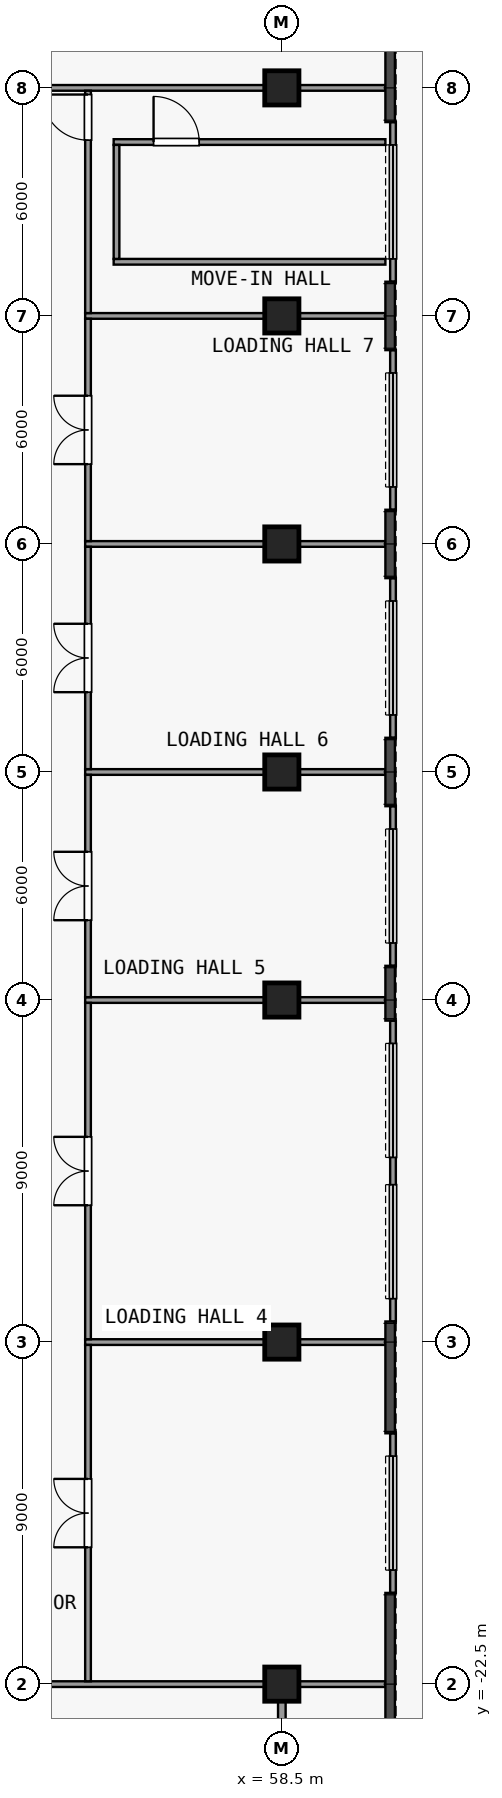
"""IFC4 building model, lengths in metres.
Left out: names, types, materials, properties, quantities, classifications, styles, units other than length and angle.
Written with IfcOpenShell. Run it as: python <this file> out.ifc"""

import sys

from ifc_helpers import new_model, si_unit, direction, frame, frame_2d, origin, origin_2d, place, context, subcontext, project, spatial, rectangle, extrude, element, fill, save


model = new_model("IFC4")
c1 = context("Model", 3, precision=1e-05, world=origin(), true_north=direction((0.0, 1.0)))
c2 = subcontext(c1, "Body", "Model", "MODEL_VIEW")
j1 = project(units=[si_unit("LENGTHUNIT", "METRE"), si_unit("PLANEANGLEUNIT", "RADIAN")], contexts=[c1])
p1 = place(None, origin())
s1 = spatial("IfcSite", under=j1, at=p1, CompositionType="ELEMENT")
p2 = place(p1, origin())
s2 = spatial("IfcBuilding", under=s1, at=p2, CompositionType="ELEMENT")
p3 = place(p2, origin())
s3 = spatial("IfcBuildingStorey", under=s2, at=p3, CompositionType="ELEMENT", Elevation=0.0)
for number, where, z_axis, x_axis in (
    (1, (58.5, -22.5, 0.0), (0.0, 0.0, 1.0), (1.0, 0.0, 0.0)),
    (2, (58.5, -13.5, 0.0), (0.0, 0.0, 1.0), (1.0, 0.0, 0.0)),
    (3, (58.5, -4.5, 0.0), (0.0, 0.0, 1.0), (1.0, 0.0, 0.0)),
    (4, (58.5, 1.5, 0.0), (0.0, 0.0, 1.0), (1.0, 0.0, 0.0)),
    (5, (58.5, 7.5, 0.0), (0.0, 0.0, 1.0), (1.0, 0.0, 0.0)),
    (6, (58.5, 13.5, 0.0), (0.0, 0.0, 1.0), (1.0, 0.0, 0.0)),
    (7, (58.5, 19.5, 0.0), (0.0, 0.0, 1.0), (1.0, 0.0, 0.0)),
):
    element("IfcColumn", number, at=place(p3, frame(where, z_axis=z_axis, x_axis=x_axis)), inside=s3, PredefinedType="COLUMN", context=c2, shape_type="SweptSolid", body=[
        extrude(rectangle(XDim=0.9, YDim=0.9, at=origin_2d()), origin(), (0.0, 0.0, 1.0), 8.0),
    ])
p4 = place(p3, frame((49.95, -22.5, 0.0), z_axis=(0.0, 0.0, 1.0), x_axis=(1.0, 0.0, 0.0)))
e8 = element("IfcWall", 8, at=p4, inside=s3, PredefinedType="PARTITIONING", context=c2, shape_type="SweptSolid", body=[
    extrude(rectangle(XDim=8.1, YDim=0.15, at=frame_2d((4.05, 0.0))), origin(), (0.0, 0.0, 1.0), 7.65),
])
p5 = place(p3, frame((58.95, -22.5, 0.0), z_axis=(0.0, 0.0, 1.0), x_axis=(1.0, 0.0, 0.0)))
e9 = element("IfcWall", 9, at=p5, inside=s3, PredefinedType="PARTITIONING", context=c2, shape_type="SweptSolid", body=[
    extrude(rectangle(XDim=2.275, YDim=0.15, at=frame_2d((1.138, 0.0))), origin(), (0.0, 0.0, 1.0), 7.65),
])
p6 = place(p3, frame((53.325, -13.5, 0.0), z_axis=(0.0, 0.0, 1.0), x_axis=(1.0, 0.0, 0.0)))
e10 = element("IfcWall", 10, at=p6, inside=s3, PredefinedType="PARTITIONING", context=c2, shape_type="SweptSolid", body=[
    extrude(rectangle(XDim=4.725, YDim=0.15, at=frame_2d((2.363, 0.0))), origin(), (0.0, 0.0, 1.0), 7.65),
])
p7 = place(p3, frame((58.95, -13.5, 0.0), z_axis=(0.0, 0.0, 1.0), x_axis=(1.0, 0.0, 0.0)))
e11 = element("IfcWall", 11, at=p7, inside=s3, PredefinedType="PARTITIONING", context=c2, shape_type="SweptSolid", body=[
    extrude(rectangle(XDim=2.275, YDim=0.15, at=frame_2d((1.138, 0.0))), origin(), (0.0, 0.0, 1.0), 7.65),
])
p8 = place(p3, frame((53.325, -4.5, 0.0), z_axis=(0.0, 0.0, 1.0), x_axis=(1.0, 0.0, 0.0)))
e12 = element("IfcWall", 12, at=p8, inside=s3, PredefinedType="PARTITIONING", context=c2, shape_type="SweptSolid", body=[
    extrude(rectangle(XDim=4.725, YDim=0.15, at=frame_2d((2.363, 0.0))), origin(), (0.0, 0.0, 1.0), 7.65),
])
p9 = place(p3, frame((58.95, -4.5, 0.0), z_axis=(0.0, 0.0, 1.0), x_axis=(1.0, 0.0, 0.0)))
e13 = element("IfcWall", 13, at=p9, inside=s3, PredefinedType="PARTITIONING", context=c2, shape_type="SweptSolid", body=[
    extrude(rectangle(XDim=2.275, YDim=0.15, at=frame_2d((1.138, 0.0))), origin(), (0.0, 0.0, 1.0), 7.65),
])
p10 = place(p3, frame((53.325, 1.5, 0.0), z_axis=(0.0, 0.0, 1.0), x_axis=(1.0, 0.0, 0.0)))
e14 = element("IfcWall", 14, at=p10, inside=s3, PredefinedType="PARTITIONING", context=c2, shape_type="SweptSolid", body=[
    extrude(rectangle(XDim=4.725, YDim=0.15, at=frame_2d((2.363, 0.0))), origin(), (0.0, 0.0, 1.0), 7.65),
])
p11 = place(p3, frame((58.95, 1.5, 0.0), z_axis=(0.0, 0.0, 1.0), x_axis=(1.0, 0.0, 0.0)))
e15 = element("IfcWall", 15, at=p11, inside=s3, PredefinedType="PARTITIONING", context=c2, shape_type="SweptSolid", body=[
    extrude(rectangle(XDim=2.275, YDim=0.15, at=frame_2d((1.138, 0.0))), origin(), (0.0, 0.0, 1.0), 7.65),
])
p12 = place(p3, frame((53.325, 7.5, 0.0), z_axis=(0.0, 0.0, 1.0), x_axis=(1.0, 0.0, 0.0)))
e16 = element("IfcWall", 16, at=p12, inside=s3, PredefinedType="PARTITIONING", context=c2, shape_type="SweptSolid", body=[
    extrude(rectangle(XDim=4.725, YDim=0.15, at=frame_2d((2.363, 0.0))), origin(), (0.0, 0.0, 1.0), 7.65),
])
p13 = place(p3, frame((58.95, 7.5, 0.0), z_axis=(0.0, 0.0, 1.0), x_axis=(1.0, 0.0, 0.0)))
e17 = element("IfcWall", 17, at=p13, inside=s3, PredefinedType="PARTITIONING", context=c2, shape_type="SweptSolid", body=[
    extrude(rectangle(XDim=2.275, YDim=0.15, at=frame_2d((1.138, 0.0))), origin(), (0.0, 0.0, 1.0), 7.65),
])
p14 = place(p3, frame((53.325, 13.5, 0.0), z_axis=(0.0, 0.0, 1.0), x_axis=(1.0, 0.0, 0.0)))
e18 = element("IfcWall", 18, at=p14, inside=s3, PredefinedType="PARTITIONING", context=c2, shape_type="SweptSolid", body=[
    extrude(rectangle(XDim=4.725, YDim=0.15, at=frame_2d((2.363, 0.0))), origin(), (0.0, 0.0, 1.0), 7.65),
])
p15 = place(p3, frame((58.95, 13.5, 0.0), z_axis=(0.0, 0.0, 1.0), x_axis=(1.0, 0.0, 0.0)))
e19 = element("IfcWall", 19, at=p15, inside=s3, PredefinedType="PARTITIONING", context=c2, shape_type="SweptSolid", body=[
    extrude(rectangle(XDim=2.275, YDim=0.15, at=frame_2d((1.138, 0.0))), origin(), (0.0, 0.0, 1.0), 7.65),
])
p16 = place(p3, frame((54.075, 14.925, 0.0), z_axis=(0.0, 0.0, 1.0), x_axis=(1.0, 0.0, 0.0)))
e20 = element("IfcWall", 20, at=p16, inside=s3, PredefinedType="PARTITIONING", context=c2, shape_type="SweptSolid", body=[
    extrude(rectangle(XDim=7.15, YDim=0.15, at=frame_2d((3.575, 0.0))), origin(), (0.0, 0.0, 1.0), 7.65),
])
p17 = place(p3, frame((54.075, 18.075, 0.0), z_axis=(0.0, 0.0, 1.0), x_axis=(1.0, 0.0, 0.0)))
e21 = element("IfcWall", 21, at=p17, inside=s3, PredefinedType="PARTITIONING", context=c2, shape_type="SweptSolid", body=[
    extrude(rectangle(XDim=7.15, YDim=0.15, at=frame_2d((3.575, 0.0))), origin(), (0.0, 0.0, 1.0), 7.65),
])
p18 = place(p17, frame((1.05, 0.0, 0.0)))
e22 = element("IfcOpeningElement", 22, at=p18, cuts=e21, PredefinedType="OPENING", context=c2, shape_type="SweptSolid", body=[
    extrude(rectangle(XDim=1.2, YDim=2.1, at=frame_2d((0.6, 1.05))), frame((0.0, 0.085, 0.0), z_axis=(0.0, -1.0, 0.0), x_axis=(1.0, 0.0, 0.0)), (0.0, 0.0, 1.0), 0.17),
])
p19 = place(p3, frame((49.95, 19.5, 0.0), z_axis=(0.0, 0.0, 1.0), x_axis=(1.0, 0.0, 0.0)))
e23 = element("IfcWall", 23, at=p19, inside=s3, PredefinedType="PARTITIONING", context=c2, shape_type="SweptSolid", body=[
    extrude(rectangle(XDim=8.1, YDim=0.15, at=frame_2d((4.05, 0.0))), origin(), (0.0, 0.0, 1.0), 7.65),
])
p20 = place(p3, frame((58.95, 19.5, 0.0), z_axis=(0.0, 0.0, 1.0), x_axis=(1.0, 0.0, 0.0)))
e24 = element("IfcWall", 24, at=p20, inside=s3, PredefinedType="PARTITIONING", context=c2, shape_type="SweptSolid", body=[
    extrude(rectangle(XDim=2.275, YDim=0.15, at=frame_2d((1.138, 0.0))), origin(), (0.0, 0.0, 1.0), 7.65),
])
p21 = place(p3, frame((53.4, -22.425, 0.0), z_axis=(0.0, 0.0, 1.0), x_axis=(0.0, 1.0, 0.0)))
e25 = element("IfcWall", 25, at=p21, inside=s3, PredefinedType="PARTITIONING", context=c2, shape_type="SweptSolid", body=[
    extrude(rectangle(XDim=8.85, YDim=0.15, at=frame_2d((4.425, 0.0))), origin(), (0.0, 0.0, 1.0), 7.65),
])
p22 = place(p21, frame((3.525, 0.0, 0.0)))
e26 = element("IfcOpeningElement", 26, at=p22, cuts=e25, PredefinedType="OPENING", context=c2, shape_type="SweptSolid", body=[
    extrude(rectangle(XDim=1.8, YDim=2.1, at=frame_2d((0.9, 1.05))), frame((0.0, 0.085, 0.0), z_axis=(0.0, -1.0, 0.0), x_axis=(1.0, 0.0, 0.0)), (0.0, 0.0, 1.0), 0.17),
])
p23 = place(p3, frame((53.4, -13.425, 0.0), z_axis=(0.0, 0.0, 1.0), x_axis=(0.0, 1.0, 0.0)))
e27 = element("IfcWall", 27, at=p23, inside=s3, PredefinedType="PARTITIONING", context=c2, shape_type="SweptSolid", body=[
    extrude(rectangle(XDim=8.85, YDim=0.15, at=frame_2d((4.425, 0.0))), origin(), (0.0, 0.0, 1.0), 7.65),
])
p24 = place(p23, frame((3.525, 0.0, 0.0)))
e28 = element("IfcOpeningElement", 28, at=p24, cuts=e27, PredefinedType="OPENING", context=c2, shape_type="SweptSolid", body=[
    extrude(rectangle(XDim=1.8, YDim=2.1, at=frame_2d((0.9, 1.05))), frame((0.0, 0.085, 0.0), z_axis=(0.0, -1.0, 0.0), x_axis=(1.0, 0.0, 0.0)), (0.0, 0.0, 1.0), 0.17),
])
p25 = place(p3, frame((53.4, -4.425, 0.0), z_axis=(0.0, 0.0, 1.0), x_axis=(0.0, 1.0, 0.0)))
e29 = element("IfcWall", 29, at=p25, inside=s3, PredefinedType="PARTITIONING", context=c2, shape_type="SweptSolid", body=[
    extrude(rectangle(XDim=5.85, YDim=0.15, at=frame_2d((2.925, 0.0))), origin(), (0.0, 0.0, 1.0), 7.65),
])
p26 = place(p25, frame((2.025, 0.0, 0.0)))
e30 = element("IfcOpeningElement", 30, at=p26, cuts=e29, PredefinedType="OPENING", context=c2, shape_type="SweptSolid", body=[
    extrude(rectangle(XDim=1.8, YDim=2.1, at=frame_2d((0.9, 1.05))), frame((0.0, 0.085, 0.0), z_axis=(0.0, -1.0, 0.0), x_axis=(1.0, 0.0, 0.0)), (0.0, 0.0, 1.0), 0.17),
])
p27 = place(p3, frame((53.4, 1.575, 0.0), z_axis=(0.0, 0.0, 1.0), x_axis=(0.0, 1.0, 0.0)))
e31 = element("IfcWall", 31, at=p27, inside=s3, PredefinedType="PARTITIONING", context=c2, shape_type="SweptSolid", body=[
    extrude(rectangle(XDim=5.85, YDim=0.15, at=frame_2d((2.925, 0.0))), origin(), (0.0, 0.0, 1.0), 7.65),
])
p28 = place(p27, frame((2.025, 0.0, 0.0)))
e32 = element("IfcOpeningElement", 32, at=p28, cuts=e31, PredefinedType="OPENING", context=c2, shape_type="SweptSolid", body=[
    extrude(rectangle(XDim=1.8, YDim=2.1, at=frame_2d((0.9, 1.05))), frame((0.0, 0.085, 0.0), z_axis=(0.0, -1.0, 0.0), x_axis=(1.0, 0.0, 0.0)), (0.0, 0.0, 1.0), 0.17),
])
p29 = place(p3, frame((53.4, 7.575, 0.0), z_axis=(0.0, 0.0, 1.0), x_axis=(0.0, 1.0, 0.0)))
e33 = element("IfcWall", 33, at=p29, inside=s3, PredefinedType="PARTITIONING", context=c2, shape_type="SweptSolid", body=[
    extrude(rectangle(XDim=5.85, YDim=0.15, at=frame_2d((2.925, 0.0))), origin(), (0.0, 0.0, 1.0), 7.65),
])
p30 = place(p29, frame((2.025, 0.0, 0.0)))
e34 = element("IfcOpeningElement", 34, at=p30, cuts=e33, PredefinedType="OPENING", context=c2, shape_type="SweptSolid", body=[
    extrude(rectangle(XDim=1.8, YDim=2.1, at=frame_2d((0.9, 1.05))), frame((0.0, 0.085, 0.0), z_axis=(0.0, -1.0, 0.0), x_axis=(1.0, 0.0, 0.0)), (0.0, 0.0, 1.0), 0.17),
])
p31 = place(p3, frame((53.4, 13.575, 0.0), z_axis=(0.0, 0.0, 1.0), x_axis=(0.0, 1.0, 0.0)))
e35 = element("IfcWall", 35, at=p31, inside=s3, PredefinedType="PARTITIONING", context=c2, shape_type="SweptSolid", body=[
    extrude(rectangle(XDim=5.85, YDim=0.15, at=frame_2d((2.925, 0.0))), origin(), (0.0, 0.0, 1.0), 7.65),
])
p32 = place(p31, frame((4.55, 0.0, 0.0)))
e36 = element("IfcOpeningElement", 36, at=p32, cuts=e35, PredefinedType="OPENING", context=c2, shape_type="SweptSolid", body=[
    extrude(rectangle(XDim=1.2, YDim=2.1, at=frame_2d((0.6, 1.05))), frame((0.0, 0.085, 0.0), z_axis=(0.0, -1.0, 0.0), x_axis=(1.0, 0.0, 0.0)), (0.0, 0.0, 1.0), 0.17),
])
p33 = place(p3, frame((54.15, 15.0, 0.0), z_axis=(0.0, 0.0, 1.0), x_axis=(0.0, 1.0, 0.0)))
e37 = element("IfcWall", 37, at=p33, inside=s3, PredefinedType="PARTITIONING", context=c2, shape_type="SweptSolid", body=[
    extrude(rectangle(XDim=3.0, YDim=0.15, at=frame_2d((1.5, 0.0))), origin(), (0.0, 0.0, 1.0), 7.65),
])
p34 = place(p3, frame((61.425, -15.9, 0.0), z_axis=(0.0, 0.0, 1.0), x_axis=(0.0, -1.0, 0.0)))
e38 = element("IfcWall", 38, at=p34, inside=s3, PredefinedType="SOLIDWALL", context=c2, shape_type="SweptSolid", body=[
    extrude(rectangle(XDim=4.2, YDim=0.15, at=frame_2d((2.1, 0.0))), origin(), (0.0, 0.0, 1.0), 7.65),
])
p35 = place(p34, frame((0.6, 0.0, 0.0)))
e39 = element("IfcOpeningElement", 39, at=p35, cuts=e38, PredefinedType="OPENING", context=c2, shape_type="SweptSolid", body=[
    extrude(rectangle(XDim=3.0, YDim=3.0, at=frame_2d((1.5, 1.5))), frame((0.0, 0.085, 0.0), z_axis=(0.0, -1.0, 0.0), x_axis=(1.0, 0.0, 0.0)), (0.0, 0.0, 1.0), 0.17),
])
p36 = place(p3, frame((61.425, 18.6, 0.0), z_axis=(0.0, 0.0, 1.0), x_axis=(0.0, -1.0, 0.0)))
e40 = element("IfcWall", 40, at=p36, inside=s3, PredefinedType="SOLIDWALL", context=c2, shape_type="SweptSolid", body=[
    extrude(rectangle(XDim=4.2, YDim=0.15, at=frame_2d((2.1, 0.0))), origin(), (0.0, 0.0, 1.0), 7.65),
])
p37 = place(p36, frame((0.6, 0.0, 0.0)))
e41 = element("IfcOpeningElement", 41, at=p37, cuts=e40, PredefinedType="OPENING", context=c2, shape_type="SweptSolid", body=[
    extrude(rectangle(XDim=3.0, YDim=4.3, at=frame_2d((1.5, 2.15))), frame((0.0, 0.085, 0.0), z_axis=(0.0, -1.0, 0.0), x_axis=(1.0, 0.0, 0.0)), (0.0, 0.0, 1.0), 0.17),
])
p38 = place(p3, frame((61.425, -5.042, 0.0), z_axis=(0.0, 0.0, 1.0), x_axis=(0.0, -1.0, 0.0)))
e42 = element("IfcWall", 42, at=p38, inside=s3, PredefinedType="SOLIDWALL", context=c2, shape_type="SweptSolid", body=[
    extrude(rectangle(XDim=7.917, YDim=0.15, at=frame_2d((3.958, 0.0))), origin(), (0.0, 0.0, 1.0), 7.65),
])
p39 = place(p38, frame((4.317, 0.0, 0.0)))
e43 = element("IfcOpeningElement", 43, at=p39, cuts=e42, PredefinedType="OPENING", context=c2, shape_type="SweptSolid", body=[
    extrude(rectangle(XDim=3.0, YDim=4.3, at=frame_2d((1.5, 2.15))), frame((0.0, 0.085, 0.0), z_axis=(0.0, -1.0, 0.0), x_axis=(1.0, 0.0, 0.0)), (0.0, 0.0, 1.0), 0.17),
])
p40 = place(p38, frame((0.6, 0.0, 0.0)))
e44 = element("IfcOpeningElement", 44, at=p40, cuts=e42, PredefinedType="OPENING", context=c2, shape_type="SweptSolid", body=[
    extrude(rectangle(XDim=3.0, YDim=4.3, at=frame_2d((1.5, 2.15))), frame((0.0, 0.085, 0.0), z_axis=(0.0, -1.0, 0.0), x_axis=(1.0, 0.0, 0.0)), (0.0, 0.0, 1.0), 0.17),
])
p41 = place(p3, frame((61.425, 0.6, 0.0), z_axis=(0.0, 0.0, 1.0), x_axis=(0.0, -1.0, 0.0)))
e45 = element("IfcWall", 45, at=p41, inside=s3, PredefinedType="SOLIDWALL", context=c2, shape_type="SweptSolid", body=[
    extrude(rectangle(XDim=4.2, YDim=0.15, at=frame_2d((2.1, 0.0))), origin(), (0.0, 0.0, 1.0), 7.65),
])
p42 = place(p41, frame((0.6, 0.0, 0.0)))
e46 = element("IfcOpeningElement", 46, at=p42, cuts=e45, PredefinedType="OPENING", context=c2, shape_type="SweptSolid", body=[
    extrude(rectangle(XDim=3.0, YDim=4.3, at=frame_2d((1.5, 2.15))), frame((0.0, 0.085, 0.0), z_axis=(0.0, -1.0, 0.0), x_axis=(1.0, 0.0, 0.0)), (0.0, 0.0, 1.0), 0.17),
])
p43 = place(p3, frame((61.425, 6.6, 0.0), z_axis=(0.0, 0.0, 1.0), x_axis=(0.0, -1.0, 0.0)))
e47 = element("IfcWall", 47, at=p43, inside=s3, PredefinedType="SOLIDWALL", context=c2, shape_type="SweptSolid", body=[
    extrude(rectangle(XDim=4.2, YDim=0.15, at=frame_2d((2.1, 0.0))), origin(), (0.0, 0.0, 1.0), 7.65),
])
p44 = place(p43, frame((0.6, 0.0, 0.0)))
e48 = element("IfcOpeningElement", 48, at=p44, cuts=e47, PredefinedType="OPENING", context=c2, shape_type="SweptSolid", body=[
    extrude(rectangle(XDim=3.0, YDim=4.3, at=frame_2d((1.5, 2.15))), frame((0.0, 0.085, 0.0), z_axis=(0.0, -1.0, 0.0), x_axis=(1.0, 0.0, 0.0)), (0.0, 0.0, 1.0), 0.17),
])
p45 = place(p3, frame((61.425, 12.6, 0.0), z_axis=(0.0, 0.0, 1.0), x_axis=(0.0, -1.0, 0.0)))
e49 = element("IfcWall", 49, at=p45, inside=s3, PredefinedType="SOLIDWALL", context=c2, shape_type="SweptSolid", body=[
    extrude(rectangle(XDim=4.2, YDim=0.15, at=frame_2d((2.1, 0.0))), origin(), (0.0, 0.0, 1.0), 7.65),
])
p46 = place(p45, frame((0.6, 0.0, 0.0)))
e50 = element("IfcOpeningElement", 50, at=p46, cuts=e49, PredefinedType="OPENING", context=c2, shape_type="SweptSolid", body=[
    extrude(rectangle(XDim=3.0, YDim=4.3, at=frame_2d((1.5, 2.15))), frame((0.0, 0.085, 0.0), z_axis=(0.0, -1.0, 0.0), x_axis=(1.0, 0.0, 0.0)), (0.0, 0.0, 1.0), 0.17),
])
p47 = place(p3, frame((58.5, -31.4, 0.0), z_axis=(0.0, 0.0, 1.0), x_axis=(0.0, 1.0, 0.0)))
e51 = element("IfcWall", 51, at=p47, inside=s3, PredefinedType="PARTITIONING", context=c2, shape_type="SweptSolid", body=[
    extrude(rectangle(XDim=8.9, YDim=0.2, at=frame_2d((4.45, 0.0))), origin(), (0.0, 0.0, 1.0), 7.65),
])
p48 = place(p47, frame((3.9, 0.0, 0.0)))
e52 = element("IfcOpeningElement", 52, at=p48, cuts=e51, PredefinedType="OPENING", context=c2, shape_type="SweptSolid", body=[
    extrude(rectangle(XDim=1.0, YDim=2.1, at=frame_2d((0.5, 1.05))), frame((0.0, 0.11, 0.0), z_axis=(0.0, -1.0, 0.0), x_axis=(1.0, 0.0, 0.0)), (0.0, 0.0, 1.0), 0.22),
])
p49 = place(p24, origin())
e53 = element("IfcDoor", 53, at=p49, inside=s3, OperationType="DOUBLE_DOOR_SINGLE_SWING", PredefinedType="DOOR", context=c2, shape_type="SweptSolid", body=[
    extrude(rectangle(XDim=1.8, YDim=2.1, at=frame_2d((0.9, 1.05))), frame((0.0, 0.025, 0.0), z_axis=(0.0, -1.0, 0.0), x_axis=(1.0, 0.0, 0.0)), (0.0, 0.0, 1.0), 0.05),
])
fill(e28, e53)
p50 = place(p26, origin())
e54 = element("IfcDoor", 54, at=p50, inside=s3, OperationType="DOUBLE_DOOR_SINGLE_SWING", PredefinedType="DOOR", context=c2, shape_type="SweptSolid", body=[
    extrude(rectangle(XDim=1.8, YDim=2.1, at=frame_2d((0.9, 1.05))), frame((0.0, 0.025, 0.0), z_axis=(0.0, -1.0, 0.0), x_axis=(1.0, 0.0, 0.0)), (0.0, 0.0, 1.0), 0.05),
])
fill(e30, e54)
p51 = place(p28, origin())
e55 = element("IfcDoor", 55, at=p51, inside=s3, OperationType="DOUBLE_DOOR_SINGLE_SWING", PredefinedType="DOOR", context=c2, shape_type="SweptSolid", body=[
    extrude(rectangle(XDim=1.8, YDim=2.1, at=frame_2d((0.9, 1.05))), frame((0.0, 0.025, 0.0), z_axis=(0.0, -1.0, 0.0), x_axis=(1.0, 0.0, 0.0)), (0.0, 0.0, 1.0), 0.05),
])
fill(e32, e55)
p52 = place(p30, origin())
e56 = element("IfcDoor", 56, at=p52, inside=s3, OperationType="DOUBLE_DOOR_SINGLE_SWING", PredefinedType="DOOR", context=c2, shape_type="SweptSolid", body=[
    extrude(rectangle(XDim=1.8, YDim=2.1, at=frame_2d((0.9, 1.05))), frame((0.0, 0.025, 0.0), z_axis=(0.0, -1.0, 0.0), x_axis=(1.0, 0.0, 0.0)), (0.0, 0.0, 1.0), 0.05),
])
fill(e34, e56)
p53 = place(p18, origin())
e57 = element("IfcDoor", 57, at=p53, inside=s3, OperationType="SINGLE_SWING_LEFT", PredefinedType="DOOR", context=c2, shape_type="SweptSolid", body=[
    extrude(rectangle(XDim=1.2, YDim=2.1, at=frame_2d((0.6, 1.05))), frame((0.0, 0.025, 0.0), z_axis=(0.0, -1.0, 0.0), x_axis=(1.0, 0.0, 0.0)), (0.0, 0.0, 1.0), 0.05),
])
fill(e22, e57)
p54 = place(p32, origin())
e58 = element("IfcDoor", 58, at=p54, inside=s3, OperationType="SINGLE_SWING_RIGHT", PredefinedType="DOOR", context=c2, shape_type="SweptSolid", body=[
    extrude(rectangle(XDim=1.2, YDim=2.1, at=frame_2d((0.6, 1.05))), frame((0.0, 0.025, 0.0), z_axis=(0.0, -1.0, 0.0), x_axis=(1.0, 0.0, 0.0)), (0.0, 0.0, 1.0), 0.05),
])
fill(e36, e58)
p55 = place(p22, origin())
e59 = element("IfcDoor", 59, at=p55, inside=s3, OperationType="DOUBLE_DOOR_SINGLE_SWING", PredefinedType="DOOR", context=c2, shape_type="SweptSolid", body=[
    extrude(rectangle(XDim=1.8, YDim=2.1, at=frame_2d((0.9, 1.05))), frame((0.0, 0.025, 0.0), z_axis=(0.0, -1.0, 0.0), x_axis=(1.0, 0.0, 0.0)), (0.0, 0.0, 1.0), 0.05),
])
fill(e26, e59)
p56 = place(p35, origin())
e60 = element("IfcDoor", 60, at=p56, inside=s3, OperationType="ROLLINGUP", PredefinedType="DOOR", context=c2, shape_type="SweptSolid", body=[
    extrude(rectangle(XDim=3.0, YDim=3.0, at=frame_2d((1.5, 1.5))), frame((0.0, 0.025, 0.0), z_axis=(0.0, -1.0, 0.0), x_axis=(1.0, 0.0, 0.0)), (0.0, 0.0, 1.0), 0.05),
])
fill(e39, e60)
p57 = place(p37, origin())
e61 = element("IfcDoor", 61, at=p57, inside=s3, OperationType="ROLLINGUP", PredefinedType="DOOR", context=c2, shape_type="SweptSolid", body=[
    extrude(rectangle(XDim=3.0, YDim=4.3, at=frame_2d((1.5, 2.15))), frame((0.0, 0.025, 0.0), z_axis=(0.0, -1.0, 0.0), x_axis=(1.0, 0.0, 0.0)), (0.0, 0.0, 1.0), 0.05),
])
fill(e41, e61)
p58 = place(p39, origin())
e62 = element("IfcDoor", 62, at=p58, inside=s3, OperationType="ROLLINGUP", PredefinedType="DOOR", context=c2, shape_type="SweptSolid", body=[
    extrude(rectangle(XDim=3.0, YDim=4.3, at=frame_2d((1.5, 2.15))), frame((0.0, 0.025, 0.0), z_axis=(0.0, -1.0, 0.0), x_axis=(1.0, 0.0, 0.0)), (0.0, 0.0, 1.0), 0.05),
])
fill(e43, e62)
p59 = place(p40, origin())
e63 = element("IfcDoor", 63, at=p59, inside=s3, OperationType="ROLLINGUP", PredefinedType="DOOR", context=c2, shape_type="SweptSolid", body=[
    extrude(rectangle(XDim=3.0, YDim=4.3, at=frame_2d((1.5, 2.15))), frame((0.0, 0.025, 0.0), z_axis=(0.0, -1.0, 0.0), x_axis=(1.0, 0.0, 0.0)), (0.0, 0.0, 1.0), 0.05),
])
fill(e44, e63)
p60 = place(p42, origin())
e64 = element("IfcDoor", 64, at=p60, inside=s3, OperationType="ROLLINGUP", PredefinedType="DOOR", context=c2, shape_type="SweptSolid", body=[
    extrude(rectangle(XDim=3.0, YDim=4.3, at=frame_2d((1.5, 2.15))), frame((0.0, 0.025, 0.0), z_axis=(0.0, -1.0, 0.0), x_axis=(1.0, 0.0, 0.0)), (0.0, 0.0, 1.0), 0.05),
])
fill(e46, e64)
p61 = place(p44, origin())
e65 = element("IfcDoor", 65, at=p61, inside=s3, OperationType="ROLLINGUP", PredefinedType="DOOR", context=c2, shape_type="SweptSolid", body=[
    extrude(rectangle(XDim=3.0, YDim=4.3, at=frame_2d((1.5, 2.15))), frame((0.0, 0.025, 0.0), z_axis=(0.0, -1.0, 0.0), x_axis=(1.0, 0.0, 0.0)), (0.0, 0.0, 1.0), 0.05),
])
fill(e48, e65)
p62 = place(p46, origin())
e66 = element("IfcDoor", 66, at=p62, inside=s3, OperationType="ROLLINGUP", PredefinedType="DOOR", context=c2, shape_type="SweptSolid", body=[
    extrude(rectangle(XDim=3.0, YDim=4.3, at=frame_2d((1.5, 2.15))), frame((0.0, 0.025, 0.0), z_axis=(0.0, -1.0, 0.0), x_axis=(1.0, 0.0, 0.0)), (0.0, 0.0, 1.0), 0.05),
])
fill(e50, e66)
save(model, sys.argv[1])
